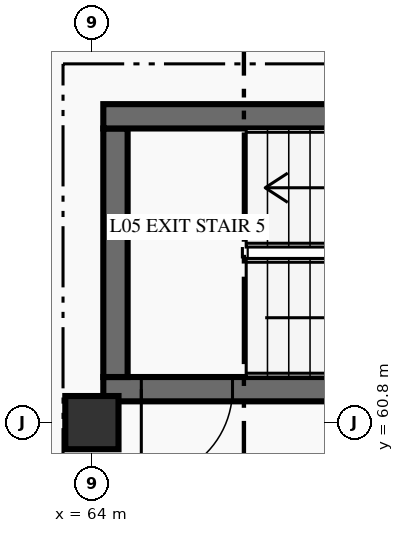
"""IFC4 building model, lengths in metres.
Left out: names, types, materials, properties, quantities, classifications, styles, units other than length and angle.
Written with IfcOpenShell. Run it as: python <this file> out.ifc"""

import sys

from ifc_helpers import new_model, si_unit, direction, frame, frame_2d, origin, origin_2d, place, context, subcontext, project, spatial, rectangle, extrude, element, fill, save


model = new_model("IFC4")
c1 = context("Model", 3, precision=1e-05, world=origin(), true_north=direction((0.0, 1.0)))
c2 = subcontext(c1, "Body", "Model", "MODEL_VIEW")
j1 = project(units=[si_unit("LENGTHUNIT", "METRE"), si_unit("PLANEANGLEUNIT", "RADIAN")], contexts=[c1])
p1 = place(None, origin())
s1 = spatial("IfcSite", under=j1, at=p1, CompositionType="ELEMENT")
p2 = place(p1, origin())
s2 = spatial("IfcBuilding", under=s1, at=p2, CompositionType="ELEMENT")
p3 = place(p2, frame((0.0, 0.0, 18.9)))
s3 = spatial("IfcBuildingStorey", under=s2, at=p3, CompositionType="ELEMENT", Elevation=18.9)
p4 = place(p3, frame((64.0, 60.8, 0.0), z_axis=(0.0, 0.0, 1.0), x_axis=(1.0, 0.0, 0.0)))
e1 = element("IfcColumn", 1, at=p4, inside=s3, PredefinedType="COLUMN", context=c2, shape_type="SweptSolid", body=[
    extrude(rectangle(XDim=0.7, YDim=0.7, at=origin_2d()), origin(), (0.0, 0.0, 1.0), 4.8),
])
p5 = place(p3, frame((71.85, 61.24, 0.0), z_axis=(0.0, 0.0, 1.0), x_axis=(-1.0, 0.0, 0.0)))
e2 = element("IfcWall", 2, at=p5, inside=s3, PredefinedType="SHEAR", context=c2, shape_type="SweptSolid", body=[
    extrude(rectangle(XDim=7.7, YDim=0.32, at=frame_2d((3.85, 0.0))), origin(), (0.0, 0.0, 1.0), 4.8),
])
p6 = place(p5, frame((6.0, 0.0, 0.0)))
e3 = element("IfcOpeningElement", 3, at=p6, cuts=e2, PredefinedType="OPENING", context=c2, shape_type="SweptSolid", body=[
    extrude(rectangle(XDim=1.2, YDim=2.2, at=frame_2d((0.6, 1.1))), frame((0.0, 0.17, 0.0), z_axis=(0.0, -1.0, 0.0), x_axis=(1.0, 0.0, 0.0)), (0.0, 0.0, 1.0), 0.34),
])
p7 = place(p3, frame((64.31, 61.4, 0.0), z_axis=(0.0, 0.0, 1.0), x_axis=(0.0, 1.0, 0.0)))
e4 = element("IfcWall", 4, at=p7, inside=s3, PredefinedType="SHEAR", context=c2, shape_type="SweptSolid", body=[
    extrude(rectangle(XDim=3.27, YDim=0.32, at=frame_2d((1.635, 0.0))), origin(), (0.0, 0.0, 1.0), 4.8),
])
p8 = place(p3, frame((64.15, 64.83, 0.0), z_axis=(0.0, 0.0, 1.0), x_axis=(1.0, 0.0, 0.0)))
e5 = element("IfcWall", 5, at=p8, inside=s3, PredefinedType="SHEAR", context=c2, shape_type="SweptSolid", body=[
    extrude(rectangle(XDim=7.7, YDim=0.32, at=frame_2d((3.85, 0.0))), origin(), (0.0, 0.0, 1.0), 4.8),
])
p9 = place(p6, origin())
e6 = element("IfcDoor", 6, at=p9, inside=s3, OperationType="SINGLE_SWING_RIGHT", PredefinedType="DOOR", context=c2, shape_type="SweptSolid", body=[
    extrude(rectangle(XDim=1.2, YDim=2.2, at=frame_2d((0.6, 1.1))), frame((0.0, 0.025, 0.0), z_axis=(0.0, -1.0, 0.0), x_axis=(1.0, 0.0, 0.0)), (0.0, 0.0, 1.0), 0.05),
])
fill(e3, e6)
save(model, sys.argv[1])
